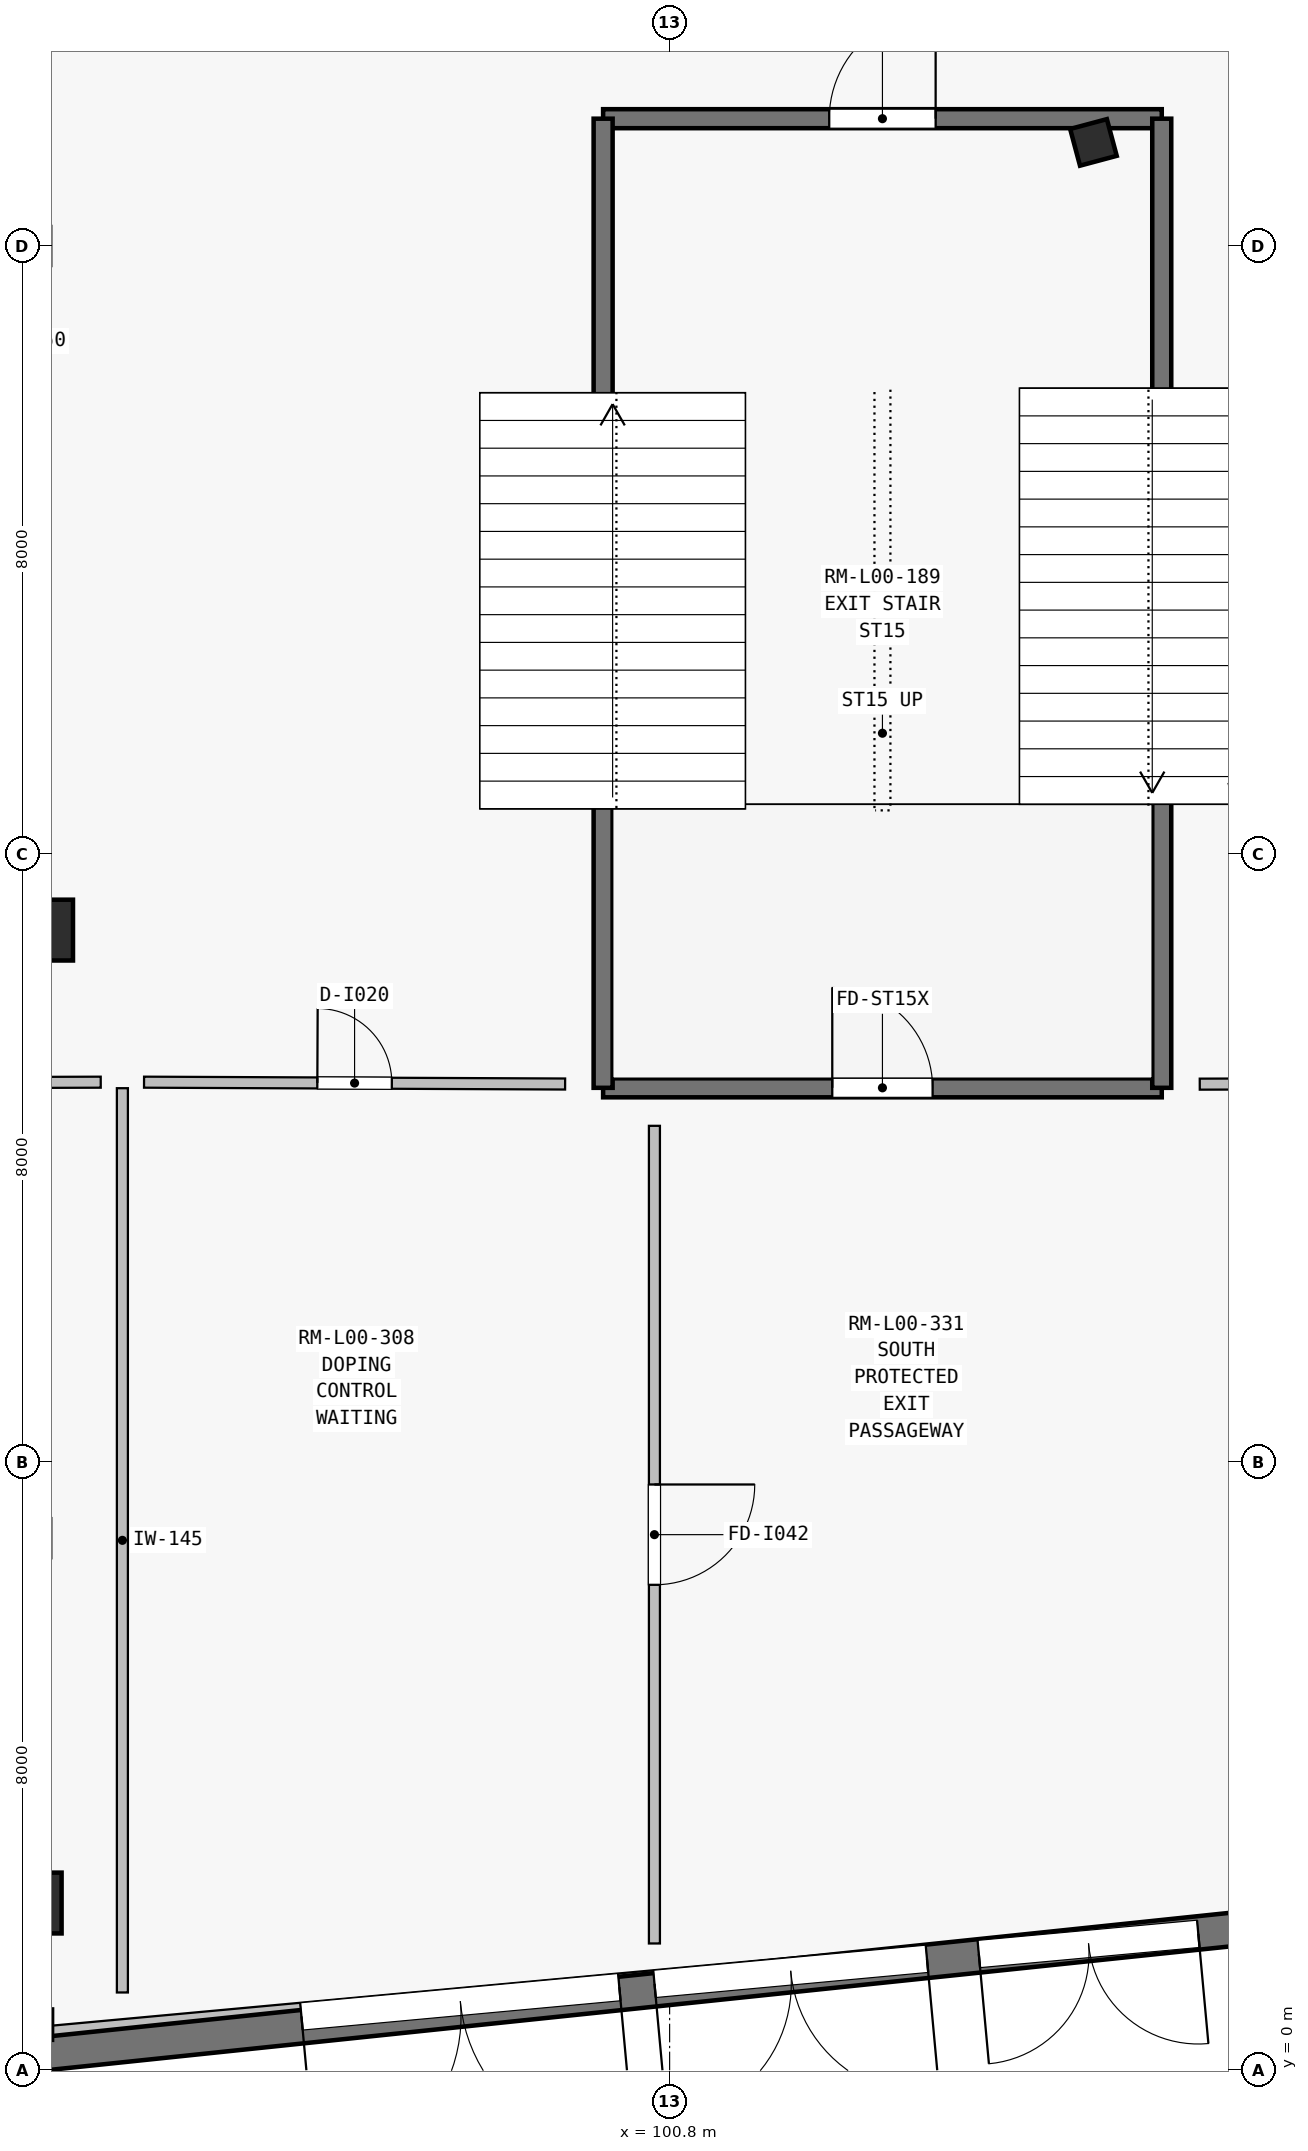
"""IFC4 building model, lengths in metres.
Left out: names, types, materials, properties, quantities, classifications, styles, units other than length and angle.
Written with IfcOpenShell. Run it as: python <this file> out.ifc"""

import sys

from ifc_helpers import new_model, si_unit, direction, frame, frame_2d, origin, origin_2d, place, context, subcontext, project, spatial, rectangle, i_section, extrude, element, fill, save


model = new_model("IFC4")
c1 = context("Model", 3, precision=1e-05, world=origin(), true_north=direction((0.0, 1.0)))
c2 = subcontext(c1, "Body", "Model", "MODEL_VIEW")
j1 = project(units=[si_unit("LENGTHUNIT", "METRE"), si_unit("PLANEANGLEUNIT", "RADIAN")], contexts=[c1])
p1 = place(None, origin())
s1 = spatial("IfcSite", under=j1, at=p1, CompositionType="ELEMENT")
p2 = place(p1, origin())
s2 = spatial("IfcBuilding", under=s1, at=p2, CompositionType="ELEMENT")
p3 = place(p2, origin())
s3 = spatial("IfcBuildingStorey", under=s2, at=p3, CompositionType="ELEMENT", Elevation=0.0)
p4 = place(p3, frame((106.376, 25.363, 0.0), z_axis=(0.0, 0.0, 1.0), x_axis=(0.258819045103, -0.965925826289, 0.0)))
e1 = element("IfcColumn", 1, at=p4, inside=s3, PredefinedType="COLUMN", context=c2, shape_type="SweptSolid", body=[
    extrude(i_section(OverallWidth=0.5, OverallDepth=0.5, WebThickness=0.025, FlangeThickness=0.042, at=origin_2d()), origin(), (0.0, 0.0, 1.0), 5.4),
])
p5 = place(p3, frame((92.4, 15.0, 0.0), z_axis=(0.0, 0.0, 1.0), x_axis=(0.0, -1.0, 0.0)))
e2 = element("IfcColumn", 2, at=p5, inside=s3, PredefinedType="COLUMN", context=c2, shape_type="SweptSolid", body=[
    extrude(rectangle(XDim=0.8, YDim=1.1, at=origin_2d()), origin(), (0.0, 0.0, 1.0), 5.4),
])
p6 = place(p3, frame((92.4, 2.2, 0.0), z_axis=(0.0, 0.0, 1.0), x_axis=(0.0, -1.0, 0.0)))
e3 = element("IfcColumn", 3, at=p6, inside=s3, PredefinedType="COLUMN", context=c2, shape_type="SweptSolid", body=[
    extrude(rectangle(XDim=0.8, YDim=0.8, at=origin_2d()), origin(), (0.0, 0.0, 1.0), 5.4),
])
p7 = place(p3, frame((116.031, 2.557, 0.0), z_axis=(0.0, 0.0, 1.0), x_axis=(-0.995785515714, -0.09171263105, 0.0)))
e4 = element("IfcWall", 4, at=p7, inside=s3, PredefinedType="SOLIDWALL", context=c2, shape_type="SweptSolid", body=[
    extrude(rectangle(XDim=23.791, YDim=0.36, at=frame_2d((11.895, 0.0))), origin(), (0.0, 0.0, 1.0), 5.15),
])
p8 = place(p7, frame((8.31, 0.0, 0.0)))
e5 = element("IfcOpeningElement", 5, at=p8, cuts=e4, PredefinedType="OPENING", context=c2, shape_type="SweptSolid", body=[
    extrude(rectangle(XDim=2.9, YDim=2.55, at=frame_2d((1.45, 1.275))), frame((0.0, 0.19, 0.0), z_axis=(0.0, -1.0, 0.0), x_axis=(1.0, 0.0, 0.0)), (0.0, 0.0, 1.0), 0.38),
])
p9 = place(p7, frame((11.895, 0.0, 0.0)))
e6 = element("IfcOpeningElement", 6, at=p9, cuts=e4, PredefinedType="OPENING", context=c2, shape_type="SweptSolid", body=[
    extrude(rectangle(XDim=3.6, YDim=2.6, at=frame_2d((1.8, 1.3))), frame((0.0, 0.19, 0.0), z_axis=(0.0, -1.0, 0.0), x_axis=(1.0, 0.0, 0.0)), (0.0, 0.0, 1.0), 0.38),
])
p10 = place(p7, frame((2.54, 0.0, 0.0)))
e7 = element("IfcOpeningElement", 7, at=p10, cuts=e4, PredefinedType="OPENING", context=c2, shape_type="SweptSolid", body=[
    extrude(rectangle(XDim=4.3, YDim=2.75, at=frame_2d((2.15, 1.375))), frame((0.0, 0.19, 0.0), z_axis=(0.0, -1.0, 0.0), x_axis=(1.0, 0.0, 0.0)), (0.0, 0.0, 1.0), 0.38),
])
p11 = place(p7, frame((15.96, 0.0, 0.0)))
e8 = element("IfcOpeningElement", 8, at=p11, cuts=e4, PredefinedType="OPENING", context=c2, shape_type="SweptSolid", body=[
    extrude(rectangle(XDim=4.2, YDim=2.7, at=frame_2d((2.1, 1.35))), frame((0.0, 0.19, 0.0), z_axis=(0.0, -1.0, 0.0), x_axis=(1.0, 0.0, 0.0)), (0.0, 0.0, 1.0), 0.38),
])
p12 = place(p3, frame((117.6, 2.836, -4.5), z_axis=(0.0, 0.0, 1.0), x_axis=(-0.994572720995, -0.104043753549, 0.0)))
e9 = element("IfcWall", 9, at=p12, inside=s3, PredefinedType="USERDEFINED", context=c2, shape_type="SweptSolid", body=[
    extrude(rectangle(XDim=25.338, YDim=0.44, at=frame_2d((12.669, 0.0))), origin(), (0.0, 0.0, 1.0), 4.5),
])
p13 = place(p3, frame((99.925, 12.925, 0.0), z_axis=(0.0, 0.0, 1.0), x_axis=(1.0, 0.0, 0.0)))
e10 = element("IfcWall", 10, at=p13, inside=s3, PredefinedType="SHEAR", context=c2, shape_type="SweptSolid", body=[
    extrude(rectangle(XDim=7.35, YDim=0.25, at=frame_2d((3.675, 0.0))), origin(), (0.0, 0.0, 1.0), 5.4),
])
p14 = place(p13, frame((3.015, 0.0, 0.0)))
e11 = element("IfcOpeningElement", 11, at=p14, cuts=e10, PredefinedType="OPENING", context=c2, shape_type="SweptSolid", body=[
    extrude(rectangle(XDim=1.32, YDim=2.2, at=frame_2d((0.66, 1.1))), frame((0.0, 0.135, 0.0), z_axis=(0.0, -1.0, 0.0), x_axis=(1.0, 0.0, 0.0)), (0.0, 0.0, 1.0), 0.27),
])
p15 = place(p3, frame((99.925, 25.675, 0.0), z_axis=(0.0, 0.0, 1.0), x_axis=(1.0, 0.0, 0.0)))
e12 = element("IfcWall", 12, at=p15, inside=s3, PredefinedType="SHEAR", context=c2, shape_type="SweptSolid", body=[
    extrude(rectangle(XDim=7.35, YDim=0.25, at=frame_2d((3.675, 0.0))), origin(), (0.0, 0.0, 1.0), 5.4),
])
p16 = place(p15, frame((2.975, 0.0, 0.0)))
e13 = element("IfcOpeningElement", 13, at=p16, cuts=e12, PredefinedType="OPENING", context=c2, shape_type="SweptSolid", body=[
    extrude(rectangle(XDim=1.4, YDim=2.2, at=frame_2d((0.7, 1.1))), frame((0.0, 0.135, 0.0), z_axis=(0.0, -1.0, 0.0), x_axis=(1.0, 0.0, 0.0)), (0.0, 0.0, 1.0), 0.27),
])
for number, where, z_axis, x_axis in (
    (14, (99.925, 12.925, 0.0), (0.0, 0.0, 1.0), (0.0, 1.0, 0.0)),
    (15, (107.275, 12.925, 0.0), (0.0, 0.0, 1.0), (0.0, 1.0, 0.0)),
):
    element("IfcWall", number, at=place(p3, frame(where, z_axis=z_axis, x_axis=x_axis)), inside=s3, PredefinedType="SHEAR", context=c2, shape_type="SweptSolid", body=[
        extrude(rectangle(XDim=12.75, YDim=0.25, at=frame_2d((6.375, 0.0))), origin(), (0.0, 0.0, 1.0), 5.4),
    ])
p17 = place(p3, frame((93.6, 12.92, 0.0), z_axis=(0.0, 0.0, 1.0), x_axis=(0.0, -1.0, 0.0)))
e16 = element("IfcWall", 16, at=p17, inside=s3, PredefinedType="PARTITIONING", context=c2, shape_type="SweptSolid", body=[
    extrude(rectangle(XDim=11.897, YDim=0.145, at=frame_2d((5.948, 0.0))), origin(), (0.0, 0.0, 1.0), 4.295),
])
p18 = place(p3, frame((85.375, 12.974, 0.0), z_axis=(0.0, 0.0, 1.0), x_axis=(0.99999517769, 0.003105575086, 0.0)))
e17 = element("IfcWall", 17, at=p18, inside=s3, PredefinedType="PARTITIONING", context=c2, shape_type="SweptSolid", body=[
    extrude(rectangle(XDim=7.94, YDim=0.145, at=frame_2d((3.97, 0.0))), origin(), (0.0, 0.0, 1.0), 4.483),
])
p19 = place(p18, frame((3.43, 0.0, 0.0)))
e18 = element("IfcOpeningElement", 18, at=p19, cuts=e17, PredefinedType="OPENING", context=c2, shape_type="SweptSolid", body=[
    extrude(rectangle(XDim=1.08, YDim=2.15, at=frame_2d((0.54, 1.075))), frame((0.0, 0.083, 0.0), z_axis=(0.0, -1.0, 0.0), x_axis=(1.0, 0.0, 0.0)), (0.0, 0.0, 1.0), 0.165),
])
p20 = place(p3, frame((93.885, 12.999, 0.0), z_axis=(0.0, 0.0, 1.0), x_axis=(0.99999048325, -0.004362729501, 0.0)))
e19 = element("IfcWall", 19, at=p20, inside=s3, PredefinedType="PARTITIONING", context=c2, shape_type="SweptSolid", body=[
    extrude(rectangle(XDim=5.54, YDim=0.145, at=frame_2d((2.77, 0.0))), origin(), (0.0, 0.0, 1.0), 5.12),
])
p21 = place(p20, frame((2.28, 0.0, 0.0)))
e20 = element("IfcOpeningElement", 20, at=p21, cuts=e19, PredefinedType="OPENING", context=c2, shape_type="SweptSolid", body=[
    extrude(rectangle(XDim=0.98, YDim=2.15, at=frame_2d((0.49, 1.075))), frame((0.0, 0.083, 0.0), z_axis=(0.0, -1.0, 0.0), x_axis=(1.0, 0.0, 0.0)), (0.0, 0.0, 1.0), 0.165),
])
p22 = place(p3, frame((100.6, 12.425, 0.0), z_axis=(0.0, 0.0, 1.0), x_axis=(0.0, -1.0, 0.0)))
e21 = element("IfcWall", 21, at=p22, inside=s3, PredefinedType="PARTITIONING", context=c2, shape_type="SweptSolid", body=[
    extrude(rectangle(XDim=10.757, YDim=0.145, at=frame_2d((5.378, 0.0))), origin(), (0.0, 0.0, 1.0), 4.295),
])
p23 = place(p22, frame((4.719, 0.0, 0.0)))
e22 = element("IfcOpeningElement", 22, at=p23, cuts=e21, PredefinedType="OPENING", context=c2, shape_type="SweptSolid", body=[
    extrude(rectangle(XDim=1.32, YDim=2.2, at=frame_2d((0.66, 1.1))), frame((0.0, 0.083, 0.0), z_axis=(0.0, -1.0, 0.0), x_axis=(1.0, 0.0, 0.0)), (0.0, 0.0, 1.0), 0.165),
])
p24 = place(p3, frame((107.775, 12.973, 0.0), z_axis=(0.0, 0.0, 1.0), x_axis=(0.999996088771, 0.002796862836, 0.0)))
e23 = element("IfcWall", 23, at=p24, inside=s3, PredefinedType="PARTITIONING", context=c2, shape_type="SweptSolid", body=[
    extrude(rectangle(XDim=9.34, YDim=0.145, at=frame_2d((4.67, 0.0))), origin(), (0.0, 0.0, 1.0), 4.483),
])
p25 = place(p8, origin())
e24 = element("IfcDoor", 24, at=p25, inside=s3, OperationType="DOUBLE_DOOR_SINGLE_SWING", PredefinedType="DOOR", context=c2, shape_type="SweptSolid", body=[
    extrude(rectangle(XDim=2.9, YDim=2.55, at=frame_2d((1.45, 1.275))), frame((0.0, 0.025, 0.0), z_axis=(0.0, -1.0, 0.0), x_axis=(1.0, 0.0, 0.0)), (0.0, 0.0, 1.0), 0.05),
])
fill(e5, e24)
p26 = place(p9, origin())
e25 = element("IfcDoor", 25, at=p26, inside=s3, OperationType="DOUBLE_DOOR_SINGLE_SWING", PredefinedType="DOOR", context=c2, shape_type="SweptSolid", body=[
    extrude(rectangle(XDim=3.6, YDim=2.6, at=frame_2d((1.8, 1.3))), frame((0.0, 0.025, 0.0), z_axis=(0.0, -1.0, 0.0), x_axis=(1.0, 0.0, 0.0)), (0.0, 0.0, 1.0), 0.05),
])
fill(e6, e25)
p27 = place(p11, origin())
e26 = element("IfcDoor", 26, at=p27, inside=s3, OperationType="DOUBLE_DOOR_SINGLE_SWING", PredefinedType="DOOR", context=c2, shape_type="SweptSolid", body=[
    extrude(rectangle(XDim=4.2, YDim=2.7, at=frame_2d((2.1, 1.35))), frame((0.0, 0.025, 0.0), z_axis=(0.0, -1.0, 0.0), x_axis=(1.0, 0.0, 0.0)), (0.0, 0.0, 1.0), 0.05),
])
fill(e8, e26)
p28 = place(p16, origin())
e27 = element("IfcDoor", 27, at=p28, inside=s3, OperationType="SINGLE_SWING_RIGHT", PredefinedType="DOOR", context=c2, shape_type="SweptSolid", body=[
    extrude(rectangle(XDim=1.4, YDim=2.2, at=frame_2d((0.7, 1.1))), frame((0.0, 0.025, 0.0), z_axis=(0.0, -1.0, 0.0), x_axis=(1.0, 0.0, 0.0)), (0.0, 0.0, 1.0), 0.05),
])
fill(e13, e27)
p29 = place(p14, origin())
e28 = element("IfcDoor", 28, at=p29, inside=s3, OperationType="SINGLE_SWING_LEFT", PredefinedType="DOOR", context=c2, shape_type="SweptSolid", body=[
    extrude(rectangle(XDim=1.32, YDim=2.2, at=frame_2d((0.66, 1.1))), frame((0.0, 0.025, 0.0), z_axis=(0.0, -1.0, 0.0), x_axis=(1.0, 0.0, 0.0)), (0.0, 0.0, 1.0), 0.05),
])
fill(e11, e28)
p30 = place(p21, origin())
e29 = element("IfcDoor", 29, at=p30, inside=s3, OperationType="SINGLE_SWING_LEFT", PredefinedType="DOOR", context=c2, shape_type="SweptSolid", body=[
    extrude(rectangle(XDim=0.98, YDim=2.15, at=frame_2d((0.49, 1.075))), frame((0.0, 0.025, 0.0), z_axis=(0.0, -1.0, 0.0), x_axis=(1.0, 0.0, 0.0)), (0.0, 0.0, 1.0), 0.05),
])
fill(e20, e29)
p31 = place(p23, origin())
e30 = element("IfcDoor", 30, at=p31, inside=s3, OperationType="SINGLE_SWING_LEFT", PredefinedType="DOOR", context=c2, shape_type="SweptSolid", body=[
    extrude(rectangle(XDim=1.32, YDim=2.2, at=frame_2d((0.66, 1.1))), frame((0.0, 0.025, 0.0), z_axis=(0.0, -1.0, 0.0), x_axis=(1.0, 0.0, 0.0)), (0.0, 0.0, 1.0), 0.05),
])
fill(e22, e30)
save(model, sys.argv[1])
